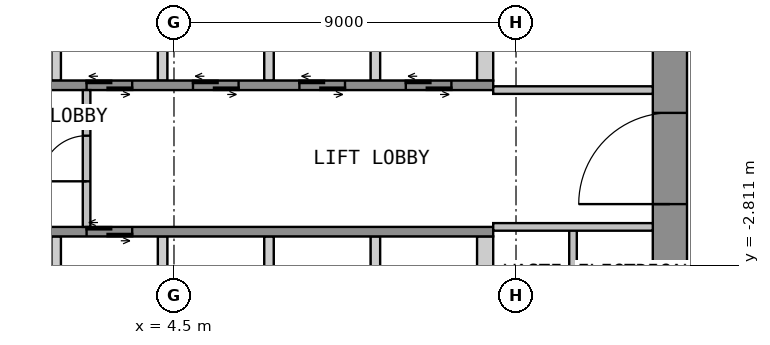
"""IFC4 building model, lengths in metres.
Left out: names, types, materials, properties, quantities, classifications, styles, units other than length and angle.
Written with IfcOpenShell. Run it as: python <this file> out.ifc"""

import sys

from ifc_helpers import new_model, si_unit, direction, frame, frame_2d, origin, place, context, subcontext, project, spatial, polyline, rectangle, outline, extrude, element, fill, save


model = new_model("IFC4")
c1 = context("Model", 3, precision=1e-05, world=origin(), true_north=direction((0.0, 1.0)))
c2 = subcontext(c1, "Body", "Model", "MODEL_VIEW")
j1 = project(units=[si_unit("LENGTHUNIT", "METRE"), si_unit("PLANEANGLEUNIT", "RADIAN")], contexts=[c1])
p1 = place(None, origin())
s1 = spatial("IfcSite", under=j1, at=p1, CompositionType="ELEMENT")
p2 = place(p1, origin())
s2 = spatial("IfcBuilding", under=s1, at=p2, CompositionType="ELEMENT")
p3 = place(p2, frame((0.0, 0.0, 30.0)))
s3 = spatial("IfcBuildingStorey", under=s2, at=p3, CompositionType="ELEMENT", Elevation=30.0)
p4 = place(p3, frame((17.55, -12.6, 0.0), z_axis=(0.0, 0.0, 1.0), x_axis=(0.0, 1.0, 0.0)))
e1 = element("IfcWall", 1, at=p4, inside=s3, PredefinedType="SHEAR", context=c2, shape_type="SweptSolid", body=[
    extrude(rectangle(XDim=25.2, YDim=0.9, at=frame_2d((12.6, 0.0))), origin(), (0.0, 0.0, 1.0), 3.525),
])
p5 = place(p4, frame((11.4, 0.0, 0.0)))
e2 = element("IfcOpeningElement", 2, at=p5, cuts=e1, PredefinedType="OPENING", context=c2, shape_type="SweptSolid", body=[
    extrude(rectangle(XDim=2.4, YDim=2.1, at=frame_2d((1.2, 1.05))), frame((0.0, 0.46, 0.0), z_axis=(0.0, -1.0, 0.0), x_axis=(1.0, 0.0, 0.0)), (0.0, 0.0, 1.0), 0.92),
])
p6 = place(p3, origin())
e3 = element("IfcWall", 3, at=p6, inside=s3, PredefinedType="SHEAR", context=c2, shape_type="SweptSolid", body=[
    extrude(outline(polyline([(1.275, 2.05), (1.525, 2.05), (1.525, 4.75), (1.275, 4.75), (1.275, 2.05)])), origin(), (0.0, 0.0, 1.0), 3.525),
])
p7 = place(p3, origin())
e4 = element("IfcWall", 4, at=p7, inside=s3, PredefinedType="SHEAR", context=c2, shape_type="SweptSolid", body=[
    extrude(outline(polyline([(4.075, 2.05), (4.325, 2.05), (4.325, 4.75), (4.075, 4.75), (4.075, 2.05)])), origin(), (0.0, 0.0, 1.0), 3.525),
])
p8 = place(p3, origin())
e5 = element("IfcWall", 5, at=p8, inside=s3, PredefinedType="SHEAR", context=c2, shape_type="SweptSolid", body=[
    extrude(outline(polyline([(6.875, 2.05), (7.125, 2.05), (7.125, 4.75), (6.875, 4.75), (6.875, 2.05)])), origin(), (0.0, 0.0, 1.0), 3.525),
])
p9 = place(p3, origin())
e6 = element("IfcWall", 6, at=p9, inside=s3, PredefinedType="SHEAR", context=c2, shape_type="SweptSolid", body=[
    extrude(outline(polyline([(9.675, 2.05), (9.925, 2.05), (9.925, 4.75), (9.675, 4.75), (9.675, 2.05)])), origin(), (0.0, 0.0, 1.0), 3.525),
])
p10 = place(p3, origin())
e7 = element("IfcWall", 7, at=p10, inside=s3, PredefinedType="SHEAR", context=c2, shape_type="SweptSolid", body=[
    extrude(outline(polyline([(12.475, 2.05), (12.9, 2.05), (12.9, 4.75), (12.475, 4.75), (12.475, 2.05)])), origin(), (0.0, 0.0, 1.0), 3.525),
])
p11 = place(p3, frame((-12.9, 1.925, 0.0), z_axis=(0.0, 0.0, 1.0), x_axis=(1.0, 0.0, 0.0)))
e8 = element("IfcWall", 8, at=p11, inside=s3, PredefinedType="SHEAR", context=c2, shape_type="SweptSolid", body=[
    extrude(rectangle(XDim=25.8, YDim=0.25, at=frame_2d((12.9, 0.0))), origin(), (0.0, 0.0, 1.0), 3.525),
])
p12 = place(p11, frame((9.5, 0.0, 0.0)))
e9 = element("IfcOpeningElement", 9, at=p12, cuts=e8, PredefinedType="OPENING", context=c2, shape_type="SweptSolid", body=[
    extrude(rectangle(XDim=1.2, YDim=2.1, at=frame_2d((0.6, 1.05))), frame((0.0, 0.135, 0.0), z_axis=(0.0, -1.0, 0.0), x_axis=(1.0, 0.0, 0.0)), (0.0, 0.0, 1.0), 0.27),
])
p13 = place(p11, frame((12.3, 0.0, 0.0)))
e10 = element("IfcOpeningElement", 10, at=p13, cuts=e8, PredefinedType="OPENING", context=c2, shape_type="SweptSolid", body=[
    extrude(rectangle(XDim=1.2, YDim=2.1, at=frame_2d((0.6, 1.05))), frame((0.0, 0.135, 0.0), z_axis=(0.0, -1.0, 0.0), x_axis=(1.0, 0.0, 0.0)), (0.0, 0.0, 1.0), 0.27),
])
p14 = place(p11, frame((15.1, 0.0, 0.0)))
e11 = element("IfcOpeningElement", 11, at=p14, cuts=e8, PredefinedType="OPENING", context=c2, shape_type="SweptSolid", body=[
    extrude(rectangle(XDim=1.2, YDim=2.1, at=frame_2d((0.6, 1.05))), frame((0.0, 0.135, 0.0), z_axis=(0.0, -1.0, 0.0), x_axis=(1.0, 0.0, 0.0)), (0.0, 0.0, 1.0), 0.27),
])
p15 = place(p11, frame((17.9, 0.0, 0.0)))
e12 = element("IfcOpeningElement", 12, at=p15, cuts=e8, PredefinedType="OPENING", context=c2, shape_type="SweptSolid", body=[
    extrude(rectangle(XDim=1.2, YDim=2.1, at=frame_2d((0.6, 1.05))), frame((0.0, 0.135, 0.0), z_axis=(0.0, -1.0, 0.0), x_axis=(1.0, 0.0, 0.0)), (0.0, 0.0, 1.0), 0.27),
])
p16 = place(p11, frame((20.7, 0.0, 0.0)))
e13 = element("IfcOpeningElement", 13, at=p16, cuts=e8, PredefinedType="OPENING", context=c2, shape_type="SweptSolid", body=[
    extrude(rectangle(XDim=1.2, YDim=2.1, at=frame_2d((0.6, 1.05))), frame((0.0, 0.135, 0.0), z_axis=(0.0, -1.0, 0.0), x_axis=(1.0, 0.0, 0.0)), (0.0, 0.0, 1.0), 0.27),
])
p17 = place(p11, frame((23.5, 0.0, 0.0)))
e14 = element("IfcOpeningElement", 14, at=p17, cuts=e8, PredefinedType="OPENING", context=c2, shape_type="SweptSolid", body=[
    extrude(rectangle(XDim=1.2, YDim=2.1, at=frame_2d((0.6, 1.05))), frame((0.0, 0.135, 0.0), z_axis=(0.0, -1.0, 0.0), x_axis=(1.0, 0.0, 0.0)), (0.0, 0.0, 1.0), 0.27),
])
p18 = place(p3, origin())
e15 = element("IfcWall", 15, at=p18, inside=s3, PredefinedType="SHEAR", context=c2, shape_type="SweptSolid", body=[
    extrude(outline(polyline([(1.275, -4.75), (1.525, -4.75), (1.525, -2.05), (1.275, -2.05), (1.275, -4.75)])), origin(), (0.0, 0.0, 1.0), 3.525),
])
p19 = place(p3, origin())
e16 = element("IfcWall", 16, at=p19, inside=s3, PredefinedType="SHEAR", context=c2, shape_type="SweptSolid", body=[
    extrude(outline(polyline([(4.075, -4.75), (4.325, -4.75), (4.325, -2.05), (4.075, -2.05), (4.075, -4.75)])), origin(), (0.0, 0.0, 1.0), 3.525),
])
p20 = place(p3, origin())
e17 = element("IfcWall", 17, at=p20, inside=s3, PredefinedType="SHEAR", context=c2, shape_type="SweptSolid", body=[
    extrude(outline(polyline([(6.875, -4.75), (7.125, -4.75), (7.125, -2.05), (6.875, -2.05), (6.875, -4.75)])), origin(), (0.0, 0.0, 1.0), 3.525),
])
p21 = place(p3, origin())
e18 = element("IfcWall", 18, at=p21, inside=s3, PredefinedType="SHEAR", context=c2, shape_type="SweptSolid", body=[
    extrude(outline(polyline([(9.675, -4.75), (9.925, -4.75), (9.925, -2.05), (9.675, -2.05), (9.675, -4.75)])), origin(), (0.0, 0.0, 1.0), 3.525),
])
p22 = place(p3, origin())
e19 = element("IfcWall", 19, at=p22, inside=s3, PredefinedType="SHEAR", context=c2, shape_type="SweptSolid", body=[
    extrude(outline(polyline([(12.475, -4.75), (12.9, -4.75), (12.9, -2.05), (12.475, -2.05), (12.475, -4.75)])), origin(), (0.0, 0.0, 1.0), 3.525),
])
p23 = place(p3, frame((-12.9, -1.925, 0.0), z_axis=(0.0, 0.0, 1.0), x_axis=(1.0, 0.0, 0.0)))
e20 = element("IfcWall", 20, at=p23, inside=s3, PredefinedType="SHEAR", context=c2, shape_type="SweptSolid", body=[
    extrude(rectangle(XDim=25.8, YDim=0.25, at=frame_2d((12.9, 0.0))), origin(), (0.0, 0.0, 1.0), 3.525),
])
p24 = place(p23, frame((1.1, 0.0, 0.0)))
e21 = element("IfcOpeningElement", 21, at=p24, cuts=e20, PredefinedType="OPENING", context=c2, shape_type="SweptSolid", body=[
    extrude(rectangle(XDim=1.2, YDim=2.1, at=frame_2d((0.6, 1.05))), frame((0.0, 0.135, 0.0), z_axis=(0.0, -1.0, 0.0), x_axis=(1.0, 0.0, 0.0)), (0.0, 0.0, 1.0), 0.27),
])
p25 = place(p23, frame((3.9, 0.0, 0.0)))
e22 = element("IfcOpeningElement", 22, at=p25, cuts=e20, PredefinedType="OPENING", context=c2, shape_type="SweptSolid", body=[
    extrude(rectangle(XDim=1.2, YDim=2.1, at=frame_2d((0.6, 1.05))), frame((0.0, 0.135, 0.0), z_axis=(0.0, -1.0, 0.0), x_axis=(1.0, 0.0, 0.0)), (0.0, 0.0, 1.0), 0.27),
])
p26 = place(p23, frame((6.7, 0.0, 0.0)))
e23 = element("IfcOpeningElement", 23, at=p26, cuts=e20, PredefinedType="OPENING", context=c2, shape_type="SweptSolid", body=[
    extrude(rectangle(XDim=1.2, YDim=2.1, at=frame_2d((0.6, 1.05))), frame((0.0, 0.135, 0.0), z_axis=(0.0, -1.0, 0.0), x_axis=(1.0, 0.0, 0.0)), (0.0, 0.0, 1.0), 0.27),
])
p27 = place(p23, frame((9.5, 0.0, 0.0)))
e24 = element("IfcOpeningElement", 24, at=p27, cuts=e20, PredefinedType="OPENING", context=c2, shape_type="SweptSolid", body=[
    extrude(rectangle(XDim=1.2, YDim=2.1, at=frame_2d((0.6, 1.05))), frame((0.0, 0.135, 0.0), z_axis=(0.0, -1.0, 0.0), x_axis=(1.0, 0.0, 0.0)), (0.0, 0.0, 1.0), 0.27),
])
p28 = place(p23, frame((12.3, 0.0, 0.0)))
e25 = element("IfcOpeningElement", 25, at=p28, cuts=e20, PredefinedType="OPENING", context=c2, shape_type="SweptSolid", body=[
    extrude(rectangle(XDim=1.2, YDim=2.1, at=frame_2d((0.6, 1.05))), frame((0.0, 0.135, 0.0), z_axis=(0.0, -1.0, 0.0), x_axis=(1.0, 0.0, 0.0)), (0.0, 0.0, 1.0), 0.27),
])
p29 = place(p23, frame((15.1, 0.0, 0.0)))
e26 = element("IfcOpeningElement", 26, at=p29, cuts=e20, PredefinedType="OPENING", context=c2, shape_type="SweptSolid", body=[
    extrude(rectangle(XDim=1.2, YDim=2.1, at=frame_2d((0.6, 1.05))), frame((0.0, 0.135, 0.0), z_axis=(0.0, -1.0, 0.0), x_axis=(1.0, 0.0, 0.0)), (0.0, 0.0, 1.0), 0.27),
])
p30 = place(p3, frame((2.2, -1.8, 0.0), z_axis=(0.0, 0.0, 1.0), x_axis=(0.0, 1.0, 0.0)))
e27 = element("IfcWall", 27, at=p30, inside=s3, PredefinedType="PARTITIONING", context=c2, shape_type="SweptSolid", body=[
    extrude(rectangle(XDim=3.6, YDim=0.2, at=frame_2d((1.8, 0.0))), origin(), (0.0, 0.0, 1.0), 3.525),
])
p31 = place(p30, frame((1.2, 0.0, 0.0)))
e28 = element("IfcOpeningElement", 28, at=p31, cuts=e27, PredefinedType="OPENING", context=c2, shape_type="SweptSolid", body=[
    extrude(rectangle(XDim=1.2, YDim=2.1, at=frame_2d((0.6, 1.05))), frame((0.0, 0.11, 0.0), z_axis=(0.0, -1.0, 0.0), x_axis=(1.0, 0.0, 0.0)), (0.0, 0.0, 1.0), 0.22),
])
p32 = place(p3, frame((12.9, 1.8, 0.0), z_axis=(0.0, 0.0, 1.0), x_axis=(1.0, 0.0, 0.0)))
e29 = element("IfcWall", 29, at=p32, inside=s3, PredefinedType="PARTITIONING", context=c2, shape_type="SweptSolid", body=[
    extrude(rectangle(XDim=4.2, YDim=0.2, at=frame_2d((2.1, 0.0))), origin(), (0.0, 0.0, 1.0), 3.525),
])
p33 = place(p3, frame((15.0, -5.0, 0.0), z_axis=(0.0, 0.0, 1.0), x_axis=(0.0, 1.0, 0.0)))
e30 = element("IfcWall", 30, at=p33, inside=s3, PredefinedType="PARTITIONING", context=c2, shape_type="SweptSolid", body=[
    extrude(rectangle(XDim=3.2, YDim=0.2, at=frame_2d((1.6, 0.0))), origin(), (0.0, 0.0, 1.0), 3.525),
])
p34 = place(p3, frame((12.9, -1.8, 0.0), z_axis=(0.0, 0.0, 1.0), x_axis=(1.0, 0.0, 0.0)))
e31 = element("IfcWall", 31, at=p34, inside=s3, PredefinedType="PARTITIONING", context=c2, shape_type="SweptSolid", body=[
    extrude(rectangle(XDim=4.2, YDim=0.2, at=frame_2d((2.1, 0.0))), origin(), (0.0, 0.0, 1.0), 3.525),
])
p35 = place(p5, origin())
e32 = element("IfcDoor", 32, at=p35, inside=s3, OperationType="DOUBLE_DOOR_DOUBLE_SWING", PredefinedType="DOOR", context=c2, shape_type="SweptSolid", body=[
    extrude(rectangle(XDim=2.4, YDim=2.1, at=frame_2d((1.2, 1.05))), frame((0.0, 0.025, 0.0), z_axis=(0.0, -1.0, 0.0), x_axis=(1.0, 0.0, 0.0)), (0.0, 0.0, 1.0), 0.05),
])
fill(e2, e32)
p36 = place(p14, origin())
e33 = element("IfcDoor", 33, at=p36, inside=s3, OperationType="DOUBLE_DOOR_SLIDING", PredefinedType="DOOR", context=c2, shape_type="SweptSolid", body=[
    extrude(rectangle(XDim=1.2, YDim=2.1, at=frame_2d((0.6, 1.05))), frame((0.0, 0.025, 0.0), z_axis=(0.0, -1.0, 0.0), x_axis=(1.0, 0.0, 0.0)), (0.0, 0.0, 1.0), 0.05),
])
fill(e11, e33)
p37 = place(p15, origin())
e34 = element("IfcDoor", 34, at=p37, inside=s3, OperationType="DOUBLE_DOOR_SLIDING", PredefinedType="DOOR", context=c2, shape_type="SweptSolid", body=[
    extrude(rectangle(XDim=1.2, YDim=2.1, at=frame_2d((0.6, 1.05))), frame((0.0, 0.025, 0.0), z_axis=(0.0, -1.0, 0.0), x_axis=(1.0, 0.0, 0.0)), (0.0, 0.0, 1.0), 0.05),
])
fill(e12, e34)
p38 = place(p16, origin())
e35 = element("IfcDoor", 35, at=p38, inside=s3, OperationType="DOUBLE_DOOR_SLIDING", PredefinedType="DOOR", context=c2, shape_type="SweptSolid", body=[
    extrude(rectangle(XDim=1.2, YDim=2.1, at=frame_2d((0.6, 1.05))), frame((0.0, 0.025, 0.0), z_axis=(0.0, -1.0, 0.0), x_axis=(1.0, 0.0, 0.0)), (0.0, 0.0, 1.0), 0.05),
])
fill(e13, e35)
p39 = place(p17, origin())
e36 = element("IfcDoor", 36, at=p39, inside=s3, OperationType="DOUBLE_DOOR_SLIDING", PredefinedType="DOOR", context=c2, shape_type="SweptSolid", body=[
    extrude(rectangle(XDim=1.2, YDim=2.1, at=frame_2d((0.6, 1.05))), frame((0.0, 0.025, 0.0), z_axis=(0.0, -1.0, 0.0), x_axis=(1.0, 0.0, 0.0)), (0.0, 0.0, 1.0), 0.05),
])
fill(e14, e36)
p40 = place(p29, origin())
e37 = element("IfcDoor", 37, at=p40, inside=s3, OperationType="DOUBLE_DOOR_SLIDING", PredefinedType="DOOR", context=c2, shape_type="SweptSolid", body=[
    extrude(rectangle(XDim=1.2, YDim=2.1, at=frame_2d((0.6, 1.05))), frame((0.0, 0.025, 0.0), z_axis=(0.0, -1.0, 0.0), x_axis=(1.0, 0.0, 0.0)), (0.0, 0.0, 1.0), 0.05),
])
fill(e26, e37)
p41 = place(p31, origin())
e38 = element("IfcDoor", 38, at=p41, inside=s3, OperationType="SINGLE_SWING_LEFT", PredefinedType="DOOR", context=c2, shape_type="SweptSolid", body=[
    extrude(rectangle(XDim=1.2, YDim=2.1, at=frame_2d((0.6, 1.05))), frame((0.0, 0.025, 0.0), z_axis=(0.0, -1.0, 0.0), x_axis=(1.0, 0.0, 0.0)), (0.0, 0.0, 1.0), 0.05),
])
fill(e28, e38)
save(model, sys.argv[1])
